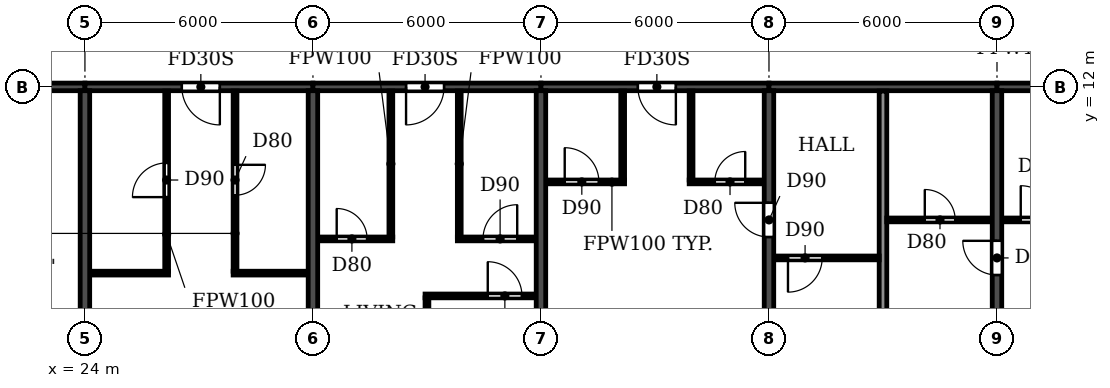
"""IFC4 building model, lengths in metres.
Left out: names, types, materials, properties, quantities, classifications, styles, units other than length and angle.
Written with IfcOpenShell. Run it as: python <this file> out.ifc"""

import sys

from ifc_helpers import new_model, si_unit, direction, frame, frame_2d, origin, place, context, subcontext, project, spatial, rectangle, extrude, element, fill, save


model = new_model("IFC4")
c1 = context("Model", 3, precision=1e-05, world=origin(), true_north=direction((0.0, 1.0)))
c2 = subcontext(c1, "Body", "Model", "MODEL_VIEW")
j1 = project(units=[si_unit("LENGTHUNIT", "METRE"), si_unit("PLANEANGLEUNIT", "RADIAN")], contexts=[c1])
p1 = place(None, origin())
s1 = spatial("IfcSite", under=j1, at=p1, CompositionType="ELEMENT")
p2 = place(p1, origin())
s2 = spatial("IfcBuilding", under=s1, at=p2, CompositionType="ELEMENT")
p3 = place(p2, frame((0.0, 0.0, 171.9)))
s3 = spatial("IfcBuildingStorey", under=s2, at=p3, CompositionType="ELEMENT", Elevation=171.9)
for number, where, z_axis, x_axis in (
    (1, (24.0, 0.2, 0.0), (0.0, 0.0, 1.0), (0.0, 1.0, 0.0)),
    (2, (30.0, 0.2, 0.0), (0.0, 0.0, 1.0), (0.0, 1.0, 0.0)),
    (3, (36.0, 0.2, 0.0), (0.0, 0.0, 1.0), (0.0, 1.0, 0.0)),
):
    element("IfcWall", number, at=place(p3, frame(where, z_axis=z_axis, x_axis=x_axis)), inside=s3, PredefinedType="SHEAR", context=c2, shape_type="SweptSolid", body=[
        extrude(rectangle(XDim=11.7, YDim=0.25, at=frame_2d((5.85, 0.0))), origin(), (0.0, 0.0, 1.0), 3.08),
    ])
p4 = place(p3, frame((42.0, 0.2, 0.0), z_axis=(0.0, 0.0, 1.0), x_axis=(0.0, 1.0, 0.0)))
e4 = element("IfcWall", 4, at=p4, inside=s3, PredefinedType="SHEAR", context=c2, shape_type="SweptSolid", body=[
    extrude(rectangle(XDim=11.7, YDim=0.25, at=frame_2d((5.85, 0.0))), origin(), (0.0, 0.0, 1.0), 3.08),
])
p5 = place(p4, frame((7.85, 0.0, 0.0)))
e5 = element("IfcOpeningElement", 5, at=p5, cuts=e4, PredefinedType="OPENING", context=c2, shape_type="SweptSolid", body=[
    extrude(rectangle(XDim=0.9, YDim=2.1, at=frame_2d((0.45, 1.05))), frame((0.0, 0.135, 0.0), z_axis=(0.0, -1.0, 0.0), x_axis=(1.0, 0.0, 0.0)), (0.0, 0.0, 1.0), 0.27),
])
p6 = place(p3, frame((48.0, 0.2, 0.0), z_axis=(0.0, 0.0, 1.0), x_axis=(0.0, 1.0, 0.0)))
e6 = element("IfcWall", 6, at=p6, inside=s3, PredefinedType="SHEAR", context=c2, shape_type="SweptSolid", body=[
    extrude(rectangle(XDim=11.7, YDim=0.25, at=frame_2d((5.85, 0.0))), origin(), (0.0, 0.0, 1.0), 3.08),
])
p7 = place(p6, frame((6.85, 0.0, 0.0)))
e7 = element("IfcOpeningElement", 7, at=p7, cuts=e6, PredefinedType="OPENING", context=c2, shape_type="SweptSolid", body=[
    extrude(rectangle(XDim=0.9, YDim=2.1, at=frame_2d((0.45, 1.05))), frame((0.0, 0.135, 0.0), z_axis=(0.0, -1.0, 0.0), x_axis=(1.0, 0.0, 0.0)), (0.0, 0.0, 1.0), 0.27),
])
p8 = place(p3, frame((18.2, 12.0, 0.0), z_axis=(0.0, 0.0, 1.0), x_axis=(1.0, 0.0, 0.0)))
e8 = element("IfcWall", 8, at=p8, inside=s3, PredefinedType="SHEAR", context=c2, shape_type="SweptSolid", body=[
    extrude(rectangle(XDim=5.8, YDim=0.2, at=frame_2d((2.9, 0.0))), origin(), (0.0, 0.0, 1.0), 2.48),
])
p9 = place(p8, frame((2.3, 0.0, 0.0)))
e9 = element("IfcOpeningElement", 9, at=p9, cuts=e8, PredefinedType="OPENING", context=c2, shape_type="SweptSolid", body=[
    extrude(rectangle(XDim=1.0, YDim=2.1, at=frame_2d((0.5, 1.05))), frame((0.0, 0.11, 0.0), z_axis=(0.0, -1.0, 0.0), x_axis=(1.0, 0.0, 0.0)), (0.0, 0.0, 1.0), 0.22),
])
p10 = place(p3, frame((24.0, 12.0, 0.0), z_axis=(0.0, 0.0, 1.0), x_axis=(1.0, 0.0, 0.0)))
e10 = element("IfcWall", 10, at=p10, inside=s3, PredefinedType="SHEAR", context=c2, shape_type="SweptSolid", body=[
    extrude(rectangle(XDim=6.0, YDim=0.2, at=frame_2d((3.0, 0.0))), origin(), (0.0, 0.0, 1.0), 2.48),
])
p11 = place(p10, frame((2.55, 0.0, 0.0)))
e11 = element("IfcOpeningElement", 11, at=p11, cuts=e10, PredefinedType="OPENING", context=c2, shape_type="SweptSolid", body=[
    extrude(rectangle(XDim=1.0, YDim=2.1, at=frame_2d((0.5, 1.05))), frame((0.0, 0.11, 0.0), z_axis=(0.0, -1.0, 0.0), x_axis=(1.0, 0.0, 0.0)), (0.0, 0.0, 1.0), 0.22),
])
p12 = place(p3, frame((30.0, 12.0, 0.0), z_axis=(0.0, 0.0, 1.0), x_axis=(1.0, 0.0, 0.0)))
e12 = element("IfcWall", 12, at=p12, inside=s3, PredefinedType="SHEAR", context=c2, shape_type="SweptSolid", body=[
    extrude(rectangle(XDim=6.0, YDim=0.2, at=frame_2d((3.0, 0.0))), origin(), (0.0, 0.0, 1.0), 2.48),
])
p13 = place(p12, frame((2.45, 0.0, 0.0)))
e13 = element("IfcOpeningElement", 13, at=p13, cuts=e12, PredefinedType="OPENING", context=c2, shape_type="SweptSolid", body=[
    extrude(rectangle(XDim=1.0, YDim=2.1, at=frame_2d((0.5, 1.05))), frame((0.0, 0.11, 0.0), z_axis=(0.0, -1.0, 0.0), x_axis=(1.0, 0.0, 0.0)), (0.0, 0.0, 1.0), 0.22),
])
p14 = place(p3, frame((36.0, 12.0, 0.0), z_axis=(0.0, 0.0, 1.0), x_axis=(1.0, 0.0, 0.0)))
e14 = element("IfcWall", 14, at=p14, inside=s3, PredefinedType="SHEAR", context=c2, shape_type="SweptSolid", body=[
    extrude(rectangle(XDim=6.0, YDim=0.2, at=frame_2d((3.0, 0.0))), origin(), (0.0, 0.0, 1.0), 2.48),
])
p15 = place(p14, frame((2.55, 0.0, 0.0)))
e15 = element("IfcOpeningElement", 15, at=p15, cuts=e14, PredefinedType="OPENING", context=c2, shape_type="SweptSolid", body=[
    extrude(rectangle(XDim=1.0, YDim=2.1, at=frame_2d((0.5, 1.05))), frame((0.0, 0.11, 0.0), z_axis=(0.0, -1.0, 0.0), x_axis=(1.0, 0.0, 0.0)), (0.0, 0.0, 1.0), 0.22),
])
p16 = place(p3, frame((42.0, 12.0, 0.0), z_axis=(0.0, 0.0, 1.0), x_axis=(1.0, 0.0, 0.0)))
e16 = element("IfcWall", 16, at=p16, inside=s3, PredefinedType="SHEAR", context=c2, shape_type="SweptSolid", body=[
    extrude(rectangle(XDim=6.0, YDim=0.2, at=frame_2d((3.0, 0.0))), origin(), (0.0, 0.0, 1.0), 2.48),
])
p17 = place(p3, frame((48.0, 12.0, 0.0), z_axis=(0.0, 0.0, 1.0), x_axis=(1.0, 0.0, 0.0)))
e17 = element("IfcWall", 17, at=p17, inside=s3, PredefinedType="SHEAR", context=c2, shape_type="SweptSolid", body=[
    extrude(rectangle(XDim=6.0, YDim=0.2, at=frame_2d((3.0, 0.0))), origin(), (0.0, 0.0, 1.0), 2.48),
])
p18 = place(p17, frame((2.55, 0.0, 0.0)))
e18 = element("IfcOpeningElement", 18, at=p18, cuts=e17, PredefinedType="OPENING", context=c2, shape_type="SweptSolid", body=[
    extrude(rectangle(XDim=1.0, YDim=2.1, at=frame_2d((0.5, 1.05))), frame((0.0, 0.11, 0.0), z_axis=(0.0, -1.0, 0.0), x_axis=(1.0, 0.0, 0.0)), (0.0, 0.0, 1.0), 0.22),
])
p19 = place(p3, frame((45.0, 0.06, 0.0), z_axis=(0.0, 0.0, 1.0), x_axis=(0.0, 1.0, 0.0)))
e19 = element("IfcWall", 19, at=p19, inside=s3, PredefinedType="PARTITIONING", context=c2, shape_type="SweptSolid", body=[
    extrude(rectangle(XDim=11.83, YDim=0.2, at=frame_2d((5.915, 0.0))), origin(), (0.0, 0.0, 1.0), 3.08),
])
p20 = place(p3, frame((32.95, 6.5, 0.0), z_axis=(0.0, 0.0, 1.0), x_axis=(1.0, 0.0, 0.0)))
e20 = element("IfcWall", 20, at=p20, inside=s3, PredefinedType="PARTITIONING", context=c2, shape_type="SweptSolid", body=[
    extrude(rectangle(XDim=2.915, YDim=0.1, at=frame_2d((1.458, 0.0))), origin(), (0.0, 0.0, 1.0), 3.08),
])
p21 = place(p20, frame((1.65, 0.0, 0.0)))
e21 = element("IfcOpeningElement", 21, at=p21, cuts=e20, PredefinedType="OPENING", context=c2, shape_type="SweptSolid", body=[
    extrude(rectangle(XDim=0.9, YDim=2.1, at=frame_2d((0.45, 1.05))), frame((0.0, 0.06, 0.0), z_axis=(0.0, -1.0, 0.0), x_axis=(1.0, 0.0, 0.0)), (0.0, 0.0, 1.0), 0.12),
])
p22 = place(p3, frame((24.135, 7.1, 0.0), z_axis=(0.0, 0.0, 1.0), x_axis=(1.0, 0.0, 0.0)))
e22 = element("IfcWall", 22, at=p22, inside=s3, PredefinedType="PARTITIONING", context=c2, shape_type="SweptSolid", body=[
    extrude(rectangle(XDim=2.065, YDim=0.1, at=frame_2d((1.032, 0.0))), origin(), (0.0, 0.0, 1.0), 3.08),
])
p23 = place(p3, frame((27.9, 7.1, 0.0), z_axis=(0.0, 0.0, 1.0), x_axis=(1.0, 0.0, 0.0)))
e23 = element("IfcWall", 23, at=p23, inside=s3, PredefinedType="PARTITIONING", context=c2, shape_type="SweptSolid", body=[
    extrude(rectangle(XDim=1.965, YDim=0.1, at=frame_2d((0.982, 0.0))), origin(), (0.0, 0.0, 1.0), 3.08),
])
p24 = place(p3, frame((42.135, 7.5, 0.0), z_axis=(0.0, 0.0, 1.0), x_axis=(1.0, 0.0, 0.0)))
e24 = element("IfcWall", 24, at=p24, inside=s3, PredefinedType="PARTITIONING", context=c2, shape_type="SweptSolid", body=[
    extrude(rectangle(XDim=2.765, YDim=0.1, at=frame_2d((1.382, 0.0))), origin(), (0.0, 0.0, 1.0), 3.08),
])
p25 = place(p24, frame((0.365, 0.0, 0.0)))
e25 = element("IfcOpeningElement", 25, at=p25, cuts=e24, PredefinedType="OPENING", context=c2, shape_type="SweptSolid", body=[
    extrude(rectangle(XDim=0.9, YDim=2.1, at=frame_2d((0.45, 1.05))), frame((0.0, 0.06, 0.0), z_axis=(0.0, -1.0, 0.0), x_axis=(1.0, 0.0, 0.0)), (0.0, 0.0, 1.0), 0.12),
])
p26 = place(p3, frame((30.135, 8.0, 0.0), z_axis=(0.0, 0.0, 1.0), x_axis=(1.0, 0.0, 0.0)))
e26 = element("IfcWall", 26, at=p26, inside=s3, PredefinedType="PARTITIONING", context=c2, shape_type="SweptSolid", body=[
    extrude(rectangle(XDim=1.965, YDim=0.1, at=frame_2d((0.982, 0.0))), origin(), (0.0, 0.0, 1.0), 3.08),
])
p27 = place(p26, frame((0.49, 0.0, 0.0)))
e27 = element("IfcOpeningElement", 27, at=p27, cuts=e26, PredefinedType="OPENING", context=c2, shape_type="SweptSolid", body=[
    extrude(rectangle(XDim=0.8, YDim=2.1, at=frame_2d((0.4, 1.05))), frame((0.0, 0.06, 0.0), z_axis=(0.0, -1.0, 0.0), x_axis=(1.0, 0.0, 0.0)), (0.0, 0.0, 1.0), 0.12),
])
p28 = place(p3, frame((33.8, 8.0, 0.0), z_axis=(0.0, 0.0, 1.0), x_axis=(1.0, 0.0, 0.0)))
e28 = element("IfcWall", 28, at=p28, inside=s3, PredefinedType="PARTITIONING", context=c2, shape_type="SweptSolid", body=[
    extrude(rectangle(XDim=2.065, YDim=0.1, at=frame_2d((1.032, 0.0))), origin(), (0.0, 0.0, 1.0), 3.08),
])
p29 = place(p28, frame((0.675, 0.0, 0.0)))
e29 = element("IfcOpeningElement", 29, at=p29, cuts=e28, PredefinedType="OPENING", context=c2, shape_type="SweptSolid", body=[
    extrude(rectangle(XDim=0.9, YDim=2.1, at=frame_2d((0.45, 1.05))), frame((0.0, 0.06, 0.0), z_axis=(0.0, -1.0, 0.0), x_axis=(1.0, 0.0, 0.0)), (0.0, 0.0, 1.0), 0.12),
])
p30 = place(p3, frame((45.1, 8.5, 0.0), z_axis=(0.0, 0.0, 1.0), x_axis=(1.0, 0.0, 0.0)))
e30 = element("IfcWall", 30, at=p30, inside=s3, PredefinedType="PARTITIONING", context=c2, shape_type="SweptSolid", body=[
    extrude(rectangle(XDim=2.765, YDim=0.1, at=frame_2d((1.382, 0.0))), origin(), (0.0, 0.0, 1.0), 3.08),
])
p31 = place(p30, frame((1.0, 0.0, 0.0)))
e31 = element("IfcOpeningElement", 31, at=p31, cuts=e30, PredefinedType="OPENING", context=c2, shape_type="SweptSolid", body=[
    extrude(rectangle(XDim=0.8, YDim=2.1, at=frame_2d((0.4, 1.05))), frame((0.0, 0.06, 0.0), z_axis=(0.0, -1.0, 0.0), x_axis=(1.0, 0.0, 0.0)), (0.0, 0.0, 1.0), 0.12),
])
p32 = place(p3, frame((48.135, 8.5, 0.0), z_axis=(0.0, 0.0, 1.0), x_axis=(1.0, 0.0, 0.0)))
e32 = element("IfcWall", 32, at=p32, inside=s3, PredefinedType="PARTITIONING", context=c2, shape_type="SweptSolid", body=[
    extrude(rectangle(XDim=2.065, YDim=0.1, at=frame_2d((1.032, 0.0))), origin(), (0.0, 0.0, 1.0), 3.08),
])
p33 = place(p32, frame((0.49, 0.0, 0.0)))
e33 = element("IfcOpeningElement", 33, at=p33, cuts=e32, PredefinedType="OPENING", context=c2, shape_type="SweptSolid", body=[
    extrude(rectangle(XDim=0.9, YDim=2.1, at=frame_2d((0.45, 1.05))), frame((0.0, 0.06, 0.0), z_axis=(0.0, -1.0, 0.0), x_axis=(1.0, 0.0, 0.0)), (0.0, 0.0, 1.0), 0.12),
])
p34 = place(p3, frame((36.135, 9.5, 0.0), z_axis=(0.0, 0.0, 1.0), x_axis=(1.0, 0.0, 0.0)))
e34 = element("IfcWall", 34, at=p34, inside=s3, PredefinedType="PARTITIONING", context=c2, shape_type="SweptSolid", body=[
    extrude(rectangle(XDim=2.065, YDim=0.1, at=frame_2d((1.032, 0.0))), origin(), (0.0, 0.0, 1.0), 3.08),
])
p35 = place(p34, frame((0.49, 0.0, 0.0)))
e35 = element("IfcOpeningElement", 35, at=p35, cuts=e34, PredefinedType="OPENING", context=c2, shape_type="SweptSolid", body=[
    extrude(rectangle(XDim=0.9, YDim=2.1, at=frame_2d((0.45, 1.05))), frame((0.0, 0.06, 0.0), z_axis=(0.0, -1.0, 0.0), x_axis=(1.0, 0.0, 0.0)), (0.0, 0.0, 1.0), 0.12),
])
p36 = place(p3, frame((39.9, 9.5, 0.0), z_axis=(0.0, 0.0, 1.0), x_axis=(1.0, 0.0, 0.0)))
e36 = element("IfcWall", 36, at=p36, inside=s3, PredefinedType="PARTITIONING", context=c2, shape_type="SweptSolid", body=[
    extrude(rectangle(XDim=1.965, YDim=0.1, at=frame_2d((0.982, 0.0))), origin(), (0.0, 0.0, 1.0), 3.08),
])
p37 = place(p36, frame((0.675, 0.0, 0.0)))
e37 = element("IfcOpeningElement", 37, at=p37, cuts=e36, PredefinedType="OPENING", context=c2, shape_type="SweptSolid", body=[
    extrude(rectangle(XDim=0.8, YDim=2.1, at=frame_2d((0.4, 1.05))), frame((0.0, 0.06, 0.0), z_axis=(0.0, -1.0, 0.0), x_axis=(1.0, 0.0, 0.0)), (0.0, 0.0, 1.0), 0.12),
])
p38 = place(p3, frame((26.15, 7.15, 0.0), z_axis=(0.0, 0.0, 1.0), x_axis=(0.0, 1.0, 0.0)))
e38 = element("IfcWall", 38, at=p38, inside=s3, PredefinedType="PARTITIONING", context=c2, shape_type="SweptSolid", body=[
    extrude(rectangle(XDim=4.74, YDim=0.1, at=frame_2d((2.37, 0.0))), origin(), (0.0, 0.0, 1.0), 3.08),
])
p39 = place(p38, frame((1.95, 0.0, 0.0)))
e39 = element("IfcOpeningElement", 39, at=p39, cuts=e38, PredefinedType="OPENING", context=c2, shape_type="SweptSolid", body=[
    extrude(rectangle(XDim=0.9, YDim=2.1, at=frame_2d((0.45, 1.05))), frame((0.0, 0.06, 0.0), z_axis=(0.0, -1.0, 0.0), x_axis=(1.0, 0.0, 0.0)), (0.0, 0.0, 1.0), 0.12),
])
p40 = place(p3, frame((27.95, 7.15, 0.0), z_axis=(0.0, 0.0, 1.0), x_axis=(0.0, 1.0, 0.0)))
e40 = element("IfcWall", 40, at=p40, inside=s3, PredefinedType="PARTITIONING", context=c2, shape_type="SweptSolid", body=[
    extrude(rectangle(XDim=4.74, YDim=0.1, at=frame_2d((2.37, 0.0))), origin(), (0.0, 0.0, 1.0), 3.08),
])
p41 = place(p40, frame((2.0, 0.0, 0.0)))
e41 = element("IfcOpeningElement", 41, at=p41, cuts=e40, PredefinedType="OPENING", context=c2, shape_type="SweptSolid", body=[
    extrude(rectangle(XDim=0.8, YDim=2.1, at=frame_2d((0.4, 1.05))), frame((0.0, 0.06, 0.0), z_axis=(0.0, -1.0, 0.0), x_axis=(1.0, 0.0, 0.0)), (0.0, 0.0, 1.0), 0.12),
])
p42 = place(p3, frame((32.05, 8.05, 0.0), z_axis=(0.0, 0.0, 1.0), x_axis=(0.0, 1.0, 0.0)))
e42 = element("IfcWall", 42, at=p42, inside=s3, PredefinedType="PARTITIONING", context=c2, shape_type="SweptSolid", body=[
    extrude(rectangle(XDim=3.84, YDim=0.1, at=frame_2d((1.92, 0.0))), origin(), (0.0, 0.0, 1.0), 3.08),
])
p43 = place(p3, frame((33.0, 0.06, 0.0), z_axis=(0.0, 0.0, 1.0), x_axis=(0.0, 1.0, 0.0)))
e43 = element("IfcWall", 43, at=p43, inside=s3, PredefinedType="PARTITIONING", context=c2, shape_type="SweptSolid", body=[
    extrude(rectangle(XDim=6.39, YDim=0.1, at=frame_2d((3.195, 0.0))), origin(), (0.0, 0.0, 1.0), 3.08),
])
p44 = place(p3, frame((33.85, 8.05, 0.0), z_axis=(0.0, 0.0, 1.0), x_axis=(0.0, 1.0, 0.0)))
e44 = element("IfcWall", 44, at=p44, inside=s3, PredefinedType="PARTITIONING", context=c2, shape_type="SweptSolid", body=[
    extrude(rectangle(XDim=3.84, YDim=0.1, at=frame_2d((1.92, 0.0))), origin(), (0.0, 0.0, 1.0), 3.08),
])
for number, where, z_axis, x_axis in (
    (45, (38.15, 9.55, 0.0), (0.0, 0.0, 1.0), (0.0, 1.0, 0.0)),
    (46, (39.95, 9.55, 0.0), (0.0, 0.0, 1.0), (0.0, 1.0, 0.0)),
):
    element("IfcWall", number, at=place(p3, frame(where, z_axis=z_axis, x_axis=x_axis)), inside=s3, PredefinedType="PARTITIONING", context=c2, shape_type="SweptSolid", body=[
        extrude(rectangle(XDim=2.34, YDim=0.1, at=frame_2d((1.17, 0.0))), origin(), (0.0, 0.0, 1.0), 3.08),
    ])
p45 = place(p39, origin())
e47 = element("IfcDoor", 47, at=p45, inside=s3, OperationType="SINGLE_SWING_LEFT", PredefinedType="DOOR", context=c2, shape_type="SweptSolid", body=[
    extrude(rectangle(XDim=0.9, YDim=2.1, at=frame_2d((0.45, 1.05))), frame((0.0, 0.025, 0.0), z_axis=(0.0, -1.0, 0.0), x_axis=(1.0, 0.0, 0.0)), (0.0, 0.0, 1.0), 0.05),
])
fill(e39, e47)
p46 = place(p11, frame((1.0, 0.0, 0.0), z_axis=(0.0, 0.0, 1.0), x_axis=(-1.0, 0.0, 0.0)))
e48 = element("IfcDoor", 48, at=p46, inside=s3, OperationType="SINGLE_SWING_LEFT", PredefinedType="DOOR", context=c2, shape_type="SweptSolid", body=[
    extrude(rectangle(XDim=1.0, YDim=2.1, at=frame_2d((0.5, 1.05))), frame((0.0, 0.025, 0.0), z_axis=(0.0, -1.0, 0.0), x_axis=(1.0, 0.0, 0.0)), (0.0, 0.0, 1.0), 0.05),
])
fill(e11, e48)
p47 = place(p41, frame((0.8, 0.0, 0.0), z_axis=(0.0, 0.0, 1.0), x_axis=(-1.0, 0.0, 0.0)))
e49 = element("IfcDoor", 49, at=p47, inside=s3, OperationType="SINGLE_SWING_LEFT", PredefinedType="DOOR", context=c2, shape_type="SweptSolid", body=[
    extrude(rectangle(XDim=0.8, YDim=2.1, at=frame_2d((0.4, 1.05))), frame((0.0, 0.025, 0.0), z_axis=(0.0, -1.0, 0.0), x_axis=(1.0, 0.0, 0.0)), (0.0, 0.0, 1.0), 0.05),
])
fill(e41, e49)
p48 = place(p27, origin())
e50 = element("IfcDoor", 50, at=p48, inside=s3, OperationType="SINGLE_SWING_LEFT", PredefinedType="DOOR", context=c2, shape_type="SweptSolid", body=[
    extrude(rectangle(XDim=0.8, YDim=2.1, at=frame_2d((0.4, 1.05))), frame((0.0, 0.025, 0.0), z_axis=(0.0, -1.0, 0.0), x_axis=(1.0, 0.0, 0.0)), (0.0, 0.0, 1.0), 0.05),
])
fill(e27, e50)
p49 = place(p13, frame((1.0, 0.0, 0.0), z_axis=(0.0, 0.0, 1.0), x_axis=(-1.0, 0.0, 0.0)))
e51 = element("IfcDoor", 51, at=p49, inside=s3, OperationType="SINGLE_SWING_RIGHT", PredefinedType="DOOR", context=c2, shape_type="SweptSolid", body=[
    extrude(rectangle(XDim=1.0, YDim=2.1, at=frame_2d((0.5, 1.05))), frame((0.0, 0.025, 0.0), z_axis=(0.0, -1.0, 0.0), x_axis=(1.0, 0.0, 0.0)), (0.0, 0.0, 1.0), 0.05),
])
fill(e13, e51)
p50 = place(p29, origin())
e52 = element("IfcDoor", 52, at=p50, inside=s3, OperationType="SINGLE_SWING_RIGHT", PredefinedType="DOOR", context=c2, shape_type="SweptSolid", body=[
    extrude(rectangle(XDim=0.9, YDim=2.1, at=frame_2d((0.45, 1.05))), frame((0.0, 0.025, 0.0), z_axis=(0.0, -1.0, 0.0), x_axis=(1.0, 0.0, 0.0)), (0.0, 0.0, 1.0), 0.05),
])
fill(e29, e52)
p51 = place(p21, origin())
e53 = element("IfcDoor", 53, at=p51, inside=s3, OperationType="SINGLE_SWING_LEFT", PredefinedType="DOOR", context=c2, shape_type="SweptSolid", body=[
    extrude(rectangle(XDim=0.9, YDim=2.1, at=frame_2d((0.45, 1.05))), frame((0.0, 0.025, 0.0), z_axis=(0.0, -1.0, 0.0), x_axis=(1.0, 0.0, 0.0)), (0.0, 0.0, 1.0), 0.05),
])
fill(e21, e53)
p52 = place(p25, frame((0.9, 0.0, 0.0), z_axis=(0.0, 0.0, 1.0), x_axis=(-1.0, 0.0, 0.0)))
e54 = element("IfcDoor", 54, at=p52, inside=s3, OperationType="SINGLE_SWING_RIGHT", PredefinedType="DOOR", context=c2, shape_type="SweptSolid", body=[
    extrude(rectangle(XDim=0.9, YDim=2.1, at=frame_2d((0.45, 1.05))), frame((0.0, 0.025, 0.0), z_axis=(0.0, -1.0, 0.0), x_axis=(1.0, 0.0, 0.0)), (0.0, 0.0, 1.0), 0.05),
])
fill(e25, e54)
p53 = place(p35, origin())
e55 = element("IfcDoor", 55, at=p53, inside=s3, OperationType="SINGLE_SWING_LEFT", PredefinedType="DOOR", context=c2, shape_type="SweptSolid", body=[
    extrude(rectangle(XDim=0.9, YDim=2.1, at=frame_2d((0.45, 1.05))), frame((0.0, 0.025, 0.0), z_axis=(0.0, -1.0, 0.0), x_axis=(1.0, 0.0, 0.0)), (0.0, 0.0, 1.0), 0.05),
])
fill(e35, e55)
p54 = place(p15, frame((1.0, 0.0, 0.0), z_axis=(0.0, 0.0, 1.0), x_axis=(-1.0, 0.0, 0.0)))
e56 = element("IfcDoor", 56, at=p54, inside=s3, OperationType="SINGLE_SWING_LEFT", PredefinedType="DOOR", context=c2, shape_type="SweptSolid", body=[
    extrude(rectangle(XDim=1.0, YDim=2.1, at=frame_2d((0.5, 1.05))), frame((0.0, 0.025, 0.0), z_axis=(0.0, -1.0, 0.0), x_axis=(1.0, 0.0, 0.0)), (0.0, 0.0, 1.0), 0.05),
])
fill(e15, e56)
p55 = place(p37, origin())
e57 = element("IfcDoor", 57, at=p55, inside=s3, OperationType="SINGLE_SWING_RIGHT", PredefinedType="DOOR", context=c2, shape_type="SweptSolid", body=[
    extrude(rectangle(XDim=0.8, YDim=2.1, at=frame_2d((0.4, 1.05))), frame((0.0, 0.025, 0.0), z_axis=(0.0, -1.0, 0.0), x_axis=(1.0, 0.0, 0.0)), (0.0, 0.0, 1.0), 0.05),
])
fill(e37, e57)
p56 = place(p5, origin())
e58 = element("IfcDoor", 58, at=p56, inside=s3, OperationType="SINGLE_SWING_RIGHT", PredefinedType="DOOR", context=c2, shape_type="SweptSolid", body=[
    extrude(rectangle(XDim=0.9, YDim=2.1, at=frame_2d((0.45, 1.05))), frame((0.0, 0.025, 0.0), z_axis=(0.0, -1.0, 0.0), x_axis=(1.0, 0.0, 0.0)), (0.0, 0.0, 1.0), 0.05),
])
fill(e5, e58)
p57 = place(p31, origin())
e59 = element("IfcDoor", 59, at=p57, inside=s3, OperationType="SINGLE_SWING_LEFT", PredefinedType="DOOR", context=c2, shape_type="SweptSolid", body=[
    extrude(rectangle(XDim=0.8, YDim=2.1, at=frame_2d((0.4, 1.05))), frame((0.0, 0.025, 0.0), z_axis=(0.0, -1.0, 0.0), x_axis=(1.0, 0.0, 0.0)), (0.0, 0.0, 1.0), 0.05),
])
fill(e31, e59)
p58 = place(p7, origin())
e60 = element("IfcDoor", 60, at=p58, inside=s3, OperationType="SINGLE_SWING_RIGHT", PredefinedType="DOOR", context=c2, shape_type="SweptSolid", body=[
    extrude(rectangle(XDim=0.9, YDim=2.1, at=frame_2d((0.45, 1.05))), frame((0.0, 0.025, 0.0), z_axis=(0.0, -1.0, 0.0), x_axis=(1.0, 0.0, 0.0)), (0.0, 0.0, 1.0), 0.05),
])
fill(e7, e60)
p59 = place(p33, origin())
e61 = element("IfcDoor", 61, at=p59, inside=s3, OperationType="SINGLE_SWING_LEFT", PredefinedType="DOOR", context=c2, shape_type="SweptSolid", body=[
    extrude(rectangle(XDim=0.9, YDim=2.1, at=frame_2d((0.45, 1.05))), frame((0.0, 0.025, 0.0), z_axis=(0.0, -1.0, 0.0), x_axis=(1.0, 0.0, 0.0)), (0.0, 0.0, 1.0), 0.05),
])
fill(e33, e61)
save(model, sys.argv[1])
